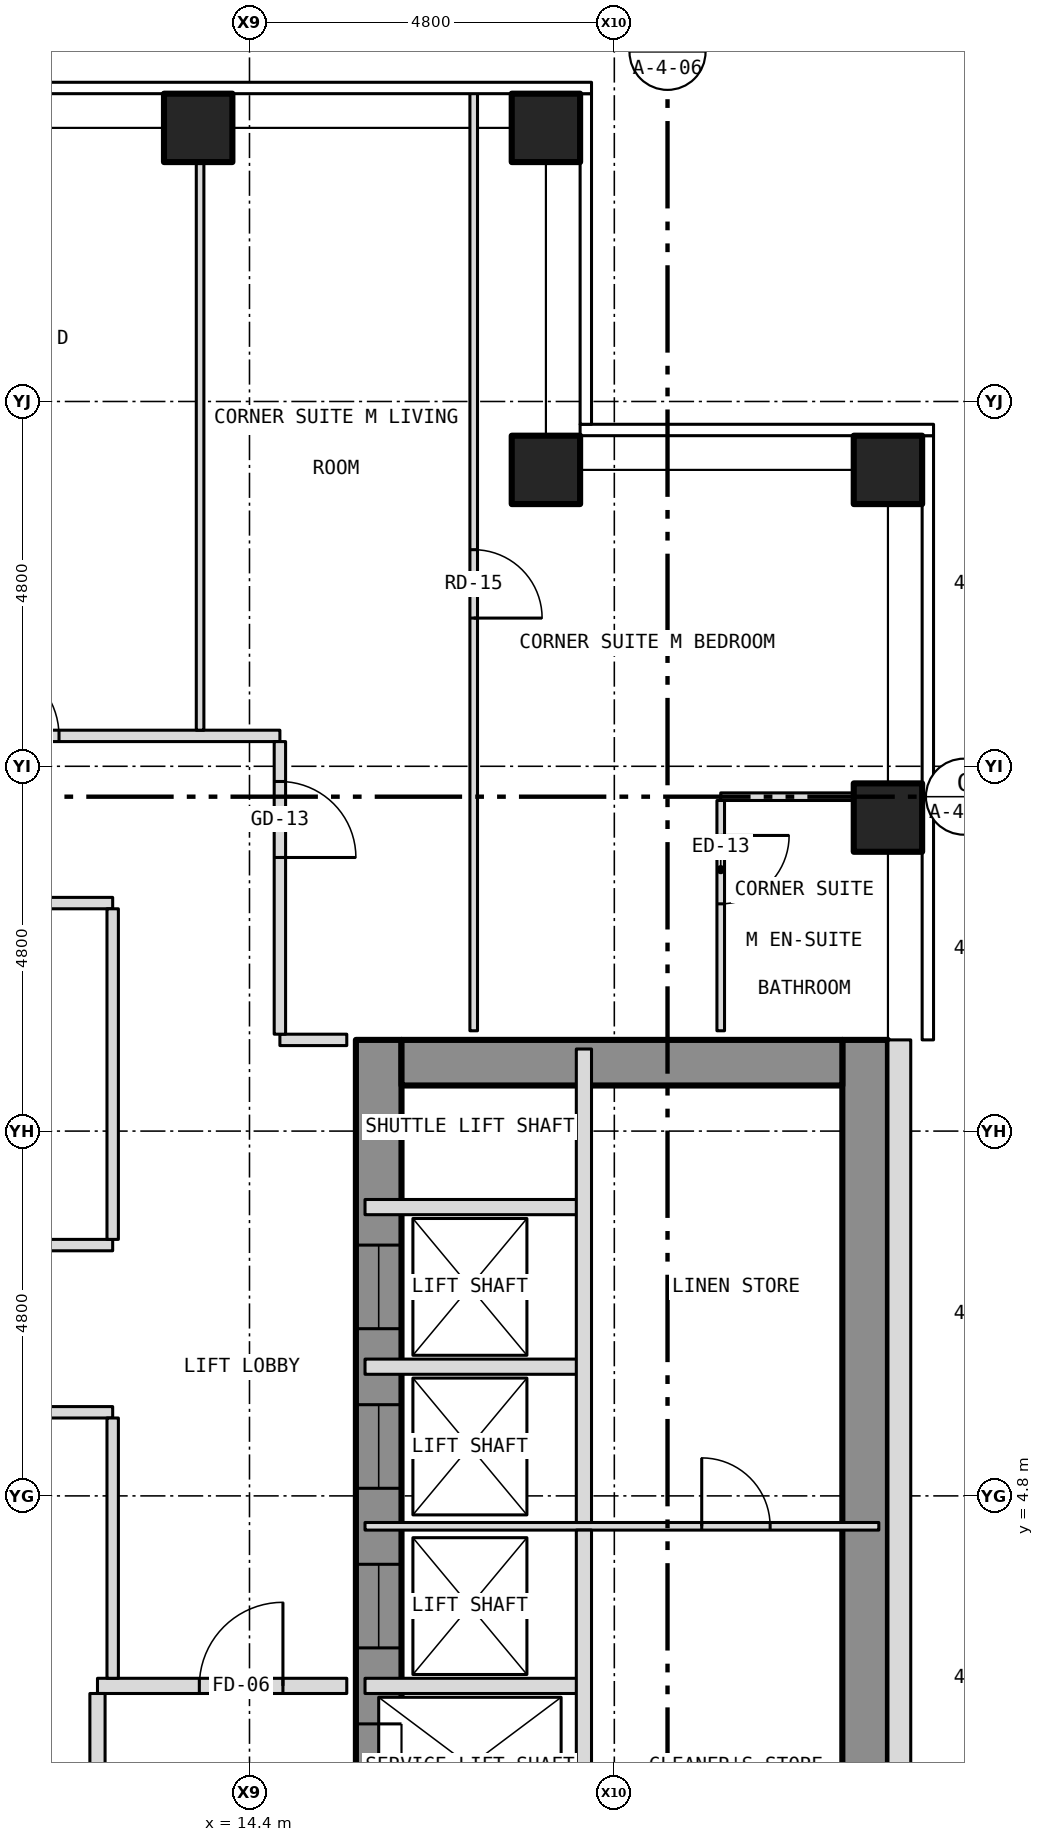
"""IFC4 building model, lengths in metres.
Left out: names, types, materials, properties, quantities, classifications, styles, units other than length and angle.
Written with IfcOpenShell. Run it as: python <this file> out.ifc"""

import sys

from ifc_helpers import new_model, si_unit, direction, frame, frame_2d, origin, origin_2d, place, context, subcontext, project, spatial, rectangle, hollow_rectangle, extrude, element, fill, save


model = new_model("IFC4")
c1 = context("Model", 3, precision=1e-05, world=origin(), true_north=direction((0.0, 1.0)))
c2 = subcontext(c1, "Body", "Model", "MODEL_VIEW")
j1 = project(units=[si_unit("LENGTHUNIT", "METRE"), si_unit("PLANEANGLEUNIT", "RADIAN")], contexts=[c1])
p1 = place(None, origin())
s1 = spatial("IfcSite", under=j1, at=p1, CompositionType="ELEMENT")
p2 = place(p1, origin())
s2 = spatial("IfcBuilding", under=s1, at=p2, CompositionType="ELEMENT")
p3 = place(p2, frame((0.0, 0.0, 92.5)))
s3 = spatial("IfcBuildingStorey", under=s2, at=p3, CompositionType="ELEMENT", Elevation=92.5)
for number, where, z_axis, x_axis in (
    (1, (13.725, 22.8, -0.15), (0.0, 0.0, 1.0), (1.0, 0.0, 0.0)),
    (2, (18.3, 22.8, -0.15), (0.0, 0.0, 1.0), (1.0, 0.0, 0.0)),
    (3, (22.8, 13.725, -0.15), (0.0, 0.0, 1.0), (1.0, 0.0, 0.0)),
    (4, (22.8, 18.3, -0.15), (0.0, 0.0, 1.0), (1.0, 0.0, 0.0)),
    (5, (18.3, 18.3, -0.15), (0.0, 0.0, 1.0), (1.0, 0.0, 0.0)),
):
    element("IfcColumn", number, at=place(p3, frame(where, z_axis=z_axis, x_axis=x_axis)), inside=s3, PredefinedType="COLUMN", context=c2, shape_type="SweptSolid", body=[
        extrude(hollow_rectangle(XDim=0.9, YDim=0.9, WallThickness=0.05, at=origin_2d()), origin(), (0.0, 0.0, 1.0), 3.5),
    ])
p4 = place(p3, frame((16.1, -10.8, 0.0), z_axis=(0.0, 0.0, 1.0), x_axis=(0.0, 1.0, 0.0)))
e6 = element("IfcWall", 6, at=p4, inside=s3, PredefinedType="SHEAR", context=c2, shape_type="SweptSolid", body=[
    extrude(rectangle(XDim=21.6, YDim=0.6, at=frame_2d((10.8, 0.0))), origin(), (0.0, 0.0, 1.0), 3.25),
])
p5 = place(p4, frame((9.4, 0.0, 0.0)))
e7 = element("IfcOpeningElement", 7, at=p5, cuts=e6, PredefinedType="OPENING", context=c2, shape_type="SweptSolid", body=[
    extrude(rectangle(XDim=1.1, YDim=2.1, at=frame_2d((0.55, 1.05))), frame((0.0, 0.312, 0.0), z_axis=(0.0, -1.0, 0.0), x_axis=(1.0, 0.0, 0.0)), (0.0, 0.0, 1.0), 0.624),
])
p6 = place(p4, frame((11.5, 0.0, 0.0)))
e8 = element("IfcOpeningElement", 8, at=p6, cuts=e6, PredefinedType="OPENING", context=c2, shape_type="SweptSolid", body=[
    extrude(rectangle(XDim=1.1, YDim=2.1, at=frame_2d((0.55, 1.05))), frame((0.0, 0.312, 0.0), z_axis=(0.0, -1.0, 0.0), x_axis=(1.0, 0.0, 0.0)), (0.0, 0.0, 1.0), 0.624),
])
p7 = place(p4, frame((13.6, 0.0, 0.0)))
e9 = element("IfcOpeningElement", 9, at=p7, cuts=e6, PredefinedType="OPENING", context=c2, shape_type="SweptSolid", body=[
    extrude(rectangle(XDim=1.1, YDim=2.1, at=frame_2d((0.55, 1.05))), frame((0.0, 0.312, 0.0), z_axis=(0.0, -1.0, 0.0), x_axis=(1.0, 0.0, 0.0)), (0.0, 0.0, 1.0), 0.624),
])
p8 = place(p4, frame((15.7, 0.0, 0.0)))
e10 = element("IfcOpeningElement", 10, at=p8, cuts=e6, PredefinedType="OPENING", context=c2, shape_type="SweptSolid", body=[
    extrude(rectangle(XDim=1.1, YDim=2.1, at=frame_2d((0.55, 1.05))), frame((0.0, 0.312, 0.0), z_axis=(0.0, -1.0, 0.0), x_axis=(1.0, 0.0, 0.0)), (0.0, 0.0, 1.0), 0.624),
])
p9 = place(p4, frame((17.8, 0.0, 0.0)))
e11 = element("IfcOpeningElement", 11, at=p9, cuts=e6, PredefinedType="OPENING", context=c2, shape_type="SweptSolid", body=[
    extrude(rectangle(XDim=1.1, YDim=2.1, at=frame_2d((0.55, 1.05))), frame((0.0, 0.312, 0.0), z_axis=(0.0, -1.0, 0.0), x_axis=(1.0, 0.0, 0.0)), (0.0, 0.0, 1.0), 0.624),
])
p10 = place(p4, frame((5.642, 0.0, 0.0)))
e12 = element("IfcOpeningElement", 12, at=p10, cuts=e6, PredefinedType="OPENING", context=c2, shape_type="SweptSolid", body=[
    extrude(rectangle(XDim=1.1, YDim=2.1, at=frame_2d((0.55, 1.05))), frame((0.0, 0.312, 0.0), z_axis=(0.0, -1.0, 0.0), x_axis=(1.0, 0.0, 0.0)), (0.0, 0.0, 1.0), 0.624),
])
p11 = place(p4, frame((7.5, 0.0, 0.0)))
e13 = element("IfcOpeningElement", 13, at=p11, cuts=e6, PredefinedType="OPENING", context=c2, shape_type="SweptSolid", body=[
    extrude(rectangle(XDim=1.1, YDim=2.1, at=frame_2d((0.55, 1.05))), frame((0.0, 0.312, 0.0), z_axis=(0.0, -1.0, 0.0), x_axis=(1.0, 0.0, 0.0)), (0.0, 0.0, 1.0), 0.624),
])
p12 = place(p3, frame((22.5, -10.8, 0.0), z_axis=(0.0, 0.0, 1.0), x_axis=(0.0, 1.0, 0.0)))
e14 = element("IfcWall", 14, at=p12, inside=s3, PredefinedType="SHEAR", context=c2, shape_type="SweptSolid", body=[
    extrude(rectangle(XDim=21.6, YDim=0.6, at=frame_2d((10.8, 0.0))), origin(), (0.0, 0.0, 1.0), 3.25),
])
p13 = place(p3, frame((16.4, 10.5, 0.0), z_axis=(0.0, 0.0, 1.0), x_axis=(1.0, 0.0, 0.0)))
e15 = element("IfcWall", 15, at=p13, inside=s3, PredefinedType="SHEAR", context=c2, shape_type="SweptSolid", body=[
    extrude(rectangle(XDim=5.8, YDim=0.6, at=frame_2d((2.9, 0.0))), origin(), (0.0, 0.0, 1.0), 3.25),
])
p14 = place(p3, frame((22.95, -10.8, 0.0), z_axis=(0.0, 0.0, 1.0), x_axis=(0.0, 1.0, 0.0)))
e16 = element("IfcWall", 16, at=p14, inside=s3, PredefinedType="SOLIDWALL", context=c2, shape_type="SweptSolid", body=[
    extrude(rectangle(XDim=21.6, YDim=0.3, at=frame_2d((10.8, 0.0))), origin(), (0.0, 0.0, 1.0), 3.5),
])
p15 = place(p14, frame((2.95, 0.0, 1.0)))
e17 = element("IfcOpeningElement", 17, at=p15, cuts=e16, PredefinedType="OPENING", context=c2, shape_type="SweptSolid", body=[
    extrude(rectangle(XDim=0.6, YDim=1.5, at=frame_2d((0.3, 0.75))), frame((0.0, 0.162, 0.0), z_axis=(0.0, -1.0, 0.0), x_axis=(1.0, 0.0, 0.0)), (0.0, 0.0, 1.0), 0.324),
])
p16 = place(p3, frame((12.4, 2.3, 0.0), z_axis=(0.0, 0.0, 1.0), x_axis=(1.0, 0.0, 0.0)))
e18 = element("IfcWall", 18, at=p16, inside=s3, PredefinedType="PARTITIONING", context=c2, shape_type="SweptSolid", body=[
    extrude(rectangle(XDim=3.28, YDim=0.2, at=frame_2d((1.64, 0.0))), origin(), (0.0, 0.0, 1.0), 3.35),
])
p17 = place(p16, frame((1.34, 0.0, 0.0)))
e19 = element("IfcOpeningElement", 19, at=p17, cuts=e18, PredefinedType="OPENING", context=c2, shape_type="SweptSolid", body=[
    extrude(rectangle(XDim=1.1, YDim=2.1, at=frame_2d((0.55, 1.05))), frame((0.0, 0.112, 0.0), z_axis=(0.0, -1.0, 0.0), x_axis=(1.0, 0.0, 0.0)), (0.0, 0.0, 1.0), 0.224),
])
p18 = place(p3, frame((15.92, 2.3, 0.0), z_axis=(0.0, 0.0, 1.0), x_axis=(1.0, 0.0, 0.0)))
e20 = element("IfcWall", 20, at=p18, inside=s3, PredefinedType="PARTITIONING", context=c2, shape_type="SweptSolid", body=[
    extrude(rectangle(XDim=2.88, YDim=0.2, at=frame_2d((1.44, 0.0))), origin(), (0.0, 0.0, 1.0), 3.25),
])
p19 = place(p3, frame((15.92, 4.4, 0.0), z_axis=(0.0, 0.0, 1.0), x_axis=(1.0, 0.0, 0.0)))
e21 = element("IfcWall", 21, at=p19, inside=s3, PredefinedType="PARTITIONING", context=c2, shape_type="SweptSolid", body=[
    extrude(rectangle(XDim=6.76, YDim=0.1, at=frame_2d((3.38, 0.0))), origin(), (0.0, 0.0, 1.0), 3.25),
])
p20 = place(p19, frame((4.43, 0.0, 0.0)))
e22 = element("IfcOpeningElement", 22, at=p20, cuts=e21, PredefinedType="OPENING", context=c2, shape_type="SweptSolid", body=[
    extrude(rectangle(XDim=0.9, YDim=2.1, at=frame_2d((0.45, 1.05))), frame((0.0, 0.062, 0.0), z_axis=(0.0, -1.0, 0.0), x_axis=(1.0, 0.0, 0.0)), (0.0, 0.0, 1.0), 0.124),
])
p21 = place(p3, frame((3.3, 5.9, 0.0), z_axis=(0.0, 0.0, 1.0), x_axis=(1.0, 0.0, 0.0)))
e23 = element("IfcWall", 23, at=p21, inside=s3, PredefinedType="PARTITIONING", context=c2, shape_type="SweptSolid", body=[
    extrude(rectangle(XDim=9.3, YDim=0.15, at=frame_2d((4.65, 0.0))), origin(), (0.0, 0.0, 1.0), 3.35),
])
p22 = place(p21, frame((4.2, 0.0, 0.0)))
e24 = element("IfcOpeningElement", 24, at=p22, cuts=e23, PredefinedType="OPENING", context=c2, shape_type="SweptSolid", body=[
    extrude(rectangle(XDim=0.9, YDim=2.1, at=frame_2d((0.45, 1.05))), frame((0.0, 0.087, 0.0), z_axis=(0.0, -1.0, 0.0), x_axis=(1.0, 0.0, 0.0)), (0.0, 0.0, 1.0), 0.174),
])
p23 = place(p3, frame((15.92, 6.5, 0.0), z_axis=(0.0, 0.0, 1.0), x_axis=(1.0, 0.0, 0.0)))
e25 = element("IfcWall", 25, at=p23, inside=s3, PredefinedType="PARTITIONING", context=c2, shape_type="SweptSolid", body=[
    extrude(rectangle(XDim=2.88, YDim=0.2, at=frame_2d((1.44, 0.0))), origin(), (0.0, 0.0, 1.0), 3.25),
])
p24 = place(p3, frame((3.3, 8.1, 0.0), z_axis=(0.0, 0.0, 1.0), x_axis=(1.0, 0.0, 0.0)))
e26 = element("IfcWall", 26, at=p24, inside=s3, PredefinedType="PARTITIONING", context=c2, shape_type="SweptSolid", body=[
    extrude(rectangle(XDim=9.3, YDim=0.15, at=frame_2d((4.65, 0.0))), origin(), (0.0, 0.0, 1.0), 3.35),
])
p25 = place(p3, frame((15.92, 8.6, 0.0), z_axis=(0.0, 0.0, 1.0), x_axis=(1.0, 0.0, 0.0)))
e27 = element("IfcWall", 27, at=p25, inside=s3, PredefinedType="PARTITIONING", context=c2, shape_type="SweptSolid", body=[
    extrude(rectangle(XDim=2.88, YDim=0.2, at=frame_2d((1.44, 0.0))), origin(), (0.0, 0.0, 1.0), 3.25),
])
p26 = place(p3, frame((14.8, 10.8, 0.0), z_axis=(0.0, 0.0, 1.0), x_axis=(1.0, 0.0, 0.0)))
e28 = element("IfcWall", 28, at=p26, inside=s3, PredefinedType="PARTITIONING", context=c2, shape_type="SweptSolid", body=[
    extrude(rectangle(XDim=0.88, YDim=0.15, at=frame_2d((0.44, 0.0))), origin(), (0.0, 0.0, 1.0), 3.35),
])
p27 = place(p3, frame((3.3, 12.6, 0.0), z_axis=(0.0, 0.0, 1.0), x_axis=(1.0, 0.0, 0.0)))
e29 = element("IfcWall", 29, at=p27, inside=s3, PredefinedType="PARTITIONING", context=c2, shape_type="SweptSolid", body=[
    extrude(rectangle(XDim=9.3, YDim=0.15, at=frame_2d((4.65, 0.0))), origin(), (0.0, 0.0, 1.0), 3.35),
])
p28 = place(p27, frame((1.875, 0.0, 0.0)))
e30 = element("IfcOpeningElement", 30, at=p28, cuts=e29, PredefinedType="OPENING", context=c2, shape_type="SweptSolid", body=[
    extrude(rectangle(XDim=0.9, YDim=2.1, at=frame_2d((0.45, 1.05))), frame((0.0, 0.087, 0.0), z_axis=(0.0, -1.0, 0.0), x_axis=(1.0, 0.0, 0.0)), (0.0, 0.0, 1.0), 0.174),
])
p29 = place(p27, frame((6.525, 0.0, 0.0)))
e31 = element("IfcOpeningElement", 31, at=p29, cuts=e29, PredefinedType="OPENING", context=c2, shape_type="SweptSolid", body=[
    extrude(rectangle(XDim=0.9, YDim=2.1, at=frame_2d((0.45, 1.05))), frame((0.0, 0.087, 0.0), z_axis=(0.0, -1.0, 0.0), x_axis=(1.0, 0.0, 0.0)), (0.0, 0.0, 1.0), 0.174),
])
p30 = place(p3, frame((20.6, 14.0, 0.0), z_axis=(0.0, 0.0, 1.0), x_axis=(1.0, 0.0, 0.0)))
e32 = element("IfcWall", 32, at=p30, inside=s3, PredefinedType="PARTITIONING", context=c2, shape_type="SweptSolid", body=[
    extrude(rectangle(XDim=2.08, YDim=0.1, at=frame_2d((1.04, 0.0))), origin(), (0.0, 0.0, 1.0), 3.35),
])
p31 = place(p3, frame((-14.8, 14.8, 0.0), z_axis=(0.0, 0.0, 1.0), x_axis=(1.0, 0.0, 0.0)))
e33 = element("IfcWall", 33, at=p31, inside=s3, PredefinedType="PARTITIONING", context=c2, shape_type="SweptSolid", body=[
    extrude(rectangle(XDim=29.6, YDim=0.15, at=frame_2d((14.8, 0.0))), origin(), (0.0, 0.0, 1.0), 3.35),
])
p32 = place(p31, frame((5.107, 0.0, 0.0)))
e34 = element("IfcOpeningElement", 34, at=p32, cuts=e33, PredefinedType="OPENING", context=c2, shape_type="SweptSolid", body=[
    extrude(rectangle(XDim=1.0, YDim=2.1, at=frame_2d((0.5, 1.05))), frame((0.0, 0.087, 0.0), z_axis=(0.0, -1.0, 0.0), x_axis=(1.0, 0.0, 0.0)), (0.0, 0.0, 1.0), 0.174),
])
p33 = place(p31, frame((10.826, 0.0, 0.0)))
e35 = element("IfcOpeningElement", 35, at=p33, cuts=e33, PredefinedType="OPENING", context=c2, shape_type="SweptSolid", body=[
    extrude(rectangle(XDim=1.0, YDim=2.1, at=frame_2d((0.5, 1.05))), frame((0.0, 0.087, 0.0), z_axis=(0.0, -1.0, 0.0), x_axis=(1.0, 0.0, 0.0)), (0.0, 0.0, 1.0), 0.174),
])
p34 = place(p31, frame((19.104, 0.0, 0.0)))
e36 = element("IfcOpeningElement", 36, at=p34, cuts=e33, PredefinedType="OPENING", context=c2, shape_type="SweptSolid", body=[
    extrude(rectangle(XDim=1.0, YDim=2.1, at=frame_2d((0.5, 1.05))), frame((0.0, 0.087, 0.0), z_axis=(0.0, -1.0, 0.0), x_axis=(1.0, 0.0, 0.0)), (0.0, 0.0, 1.0), 0.174),
])
p35 = place(p31, frame((25.694, 0.0, 0.0)))
e37 = element("IfcOpeningElement", 37, at=p35, cuts=e33, PredefinedType="OPENING", context=c2, shape_type="SweptSolid", body=[
    extrude(rectangle(XDim=1.0, YDim=2.1, at=frame_2d((0.5, 1.05))), frame((0.0, 0.087, 0.0), z_axis=(0.0, -1.0, 0.0), x_axis=(1.0, 0.0, 0.0)), (0.0, 0.0, 1.0), 0.174),
])
p36 = place(p3, frame((12.4, -1.8, 0.0), z_axis=(0.0, 0.0, 1.0), x_axis=(0.0, 1.0, 0.0)))
e38 = element("IfcWall", 38, at=p36, inside=s3, PredefinedType="PARTITIONING", context=c2, shape_type="SweptSolid", body=[
    extrude(rectangle(XDim=4.0, YDim=0.2, at=frame_2d((2.0, 0.0))), origin(), (0.0, 0.0, 1.0), 3.35),
])
p37 = place(p3, frame((12.6, 2.4, 0.0), z_axis=(0.0, 0.0, 1.0), x_axis=(0.0, 1.0, 0.0)))
e39 = element("IfcWall", 39, at=p37, inside=s3, PredefinedType="PARTITIONING", context=c2, shape_type="SweptSolid", body=[
    extrude(rectangle(XDim=3.425, YDim=0.15, at=frame_2d((1.712, 0.0))), origin(), (0.0, 0.0, 1.0), 3.35),
])
p38 = place(p3, frame((12.6, 8.175, 0.0), z_axis=(0.0, 0.0, 1.0), x_axis=(0.0, 1.0, 0.0)))
e40 = element("IfcWall", 40, at=p38, inside=s3, PredefinedType="PARTITIONING", context=c2, shape_type="SweptSolid", body=[
    extrude(rectangle(XDim=4.35, YDim=0.15, at=frame_2d((2.175, 0.0))), origin(), (0.0, 0.0, 1.0), 3.35),
])
p39 = place(p3, frame((13.75, 14.875, 0.0), z_axis=(0.0, 0.0, 1.0), x_axis=(0.0, 1.0, 0.0)))
e41 = element("IfcWall", 41, at=p39, inside=s3, PredefinedType="PARTITIONING", context=c2, shape_type="SweptSolid", body=[
    extrude(rectangle(XDim=7.805, YDim=0.1, at=frame_2d((3.902, 0.0))), origin(), (0.0, 0.0, 1.0), 3.35),
])
p40 = place(p3, frame((14.8, 10.875, 0.0), z_axis=(0.0, 0.0, 1.0), x_axis=(0.0, 1.0, 0.0)))
e42 = element("IfcWall", 42, at=p40, inside=s3, PredefinedType="PARTITIONING", context=c2, shape_type="SweptSolid", body=[
    extrude(rectangle(XDim=3.85, YDim=0.15, at=frame_2d((1.925, 0.0))), origin(), (0.0, 0.0, 1.0), 3.35),
])
p41 = place(p40, frame((2.325, 0.0, 0.0)))
e43 = element("IfcOpeningElement", 43, at=p41, cuts=e42, PredefinedType="OPENING", context=c2, shape_type="SweptSolid", body=[
    extrude(rectangle(XDim=1.0, YDim=2.1, at=frame_2d((0.5, 1.05))), frame((0.0, 0.087, 0.0), z_axis=(0.0, -1.0, 0.0), x_axis=(1.0, 0.0, 0.0)), (0.0, 0.0, 1.0), 0.174),
])
p42 = place(p3, frame((17.35, 10.92, 0.0), z_axis=(0.0, 0.0, 1.0), x_axis=(0.0, 1.0, 0.0)))
e44 = element("IfcWall", 44, at=p42, inside=s3, PredefinedType="PARTITIONING", context=c2, shape_type="SweptSolid", body=[
    extrude(rectangle(XDim=12.36, YDim=0.1, at=frame_2d((6.18, 0.0))), origin(), (0.0, 0.0, 1.0), 3.35),
])
p43 = place(p42, frame((5.43, 0.0, 0.0)))
e45 = element("IfcOpeningElement", 45, at=p43, cuts=e44, PredefinedType="OPENING", context=c2, shape_type="SweptSolid", body=[
    extrude(rectangle(XDim=0.9, YDim=2.1, at=frame_2d((0.45, 1.05))), frame((0.0, 0.062, 0.0), z_axis=(0.0, -1.0, 0.0), x_axis=(1.0, 0.0, 0.0)), (0.0, 0.0, 1.0), 0.124),
])
p44 = place(p3, frame((18.8, -1.8, 0.0), z_axis=(0.0, 0.0, 1.0), x_axis=(0.0, 1.0, 0.0)))
e46 = element("IfcWall", 46, at=p44, inside=s3, PredefinedType="PARTITIONING", context=c2, shape_type="SweptSolid", body=[
    extrude(rectangle(XDim=6.15, YDim=0.2, at=frame_2d((3.075, 0.0))), origin(), (0.0, 0.0, 1.0), 3.25),
])
p45 = place(p3, frame((18.8, 4.45, 0.0), z_axis=(0.0, 0.0, 1.0), x_axis=(0.0, 1.0, 0.0)))
e47 = element("IfcWall", 47, at=p45, inside=s3, PredefinedType="PARTITIONING", context=c2, shape_type="SweptSolid", body=[
    extrude(rectangle(XDim=6.23, YDim=0.2, at=frame_2d((3.115, 0.0))), origin(), (0.0, 0.0, 1.0), 3.25),
])
p46 = place(p3, frame((20.6, 10.92, 0.0), z_axis=(0.0, 0.0, 1.0), x_axis=(0.0, 1.0, 0.0)))
e48 = element("IfcWall", 48, at=p46, inside=s3, PredefinedType="PARTITIONING", context=c2, shape_type="SweptSolid", body=[
    extrude(rectangle(XDim=3.03, YDim=0.1, at=frame_2d((1.515, 0.0))), origin(), (0.0, 0.0, 1.0), 3.35),
])
p47 = place(p46, frame((1.67, 0.0, 0.0)))
e49 = element("IfcOpeningElement", 49, at=p47, cuts=e48, PredefinedType="OPENING", context=c2, shape_type="SweptSolid", body=[
    extrude(rectangle(XDim=0.9, YDim=2.1, at=frame_2d((0.45, 1.05))), frame((0.0, 0.062, 0.0), z_axis=(0.0, -1.0, 0.0), x_axis=(1.0, 0.0, 0.0)), (0.0, 0.0, 1.0), 0.124),
])
p48 = place(p6, origin())
e50 = element("IfcDoor", 50, at=p48, inside=s3, OperationType="SLIDING_TO_LEFT", PredefinedType="DOOR", context=c2, shape_type="SweptSolid", body=[
    extrude(rectangle(XDim=1.1, YDim=2.1, at=frame_2d((0.55, 1.05))), frame((0.0, 0.025, 0.0), z_axis=(0.0, -1.0, 0.0), x_axis=(1.0, 0.0, 0.0)), (0.0, 0.0, 1.0), 0.05),
])
fill(e8, e50)
p49 = place(p7, origin())
e51 = element("IfcDoor", 51, at=p49, inside=s3, OperationType="SLIDING_TO_LEFT", PredefinedType="DOOR", context=c2, shape_type="SweptSolid", body=[
    extrude(rectangle(XDim=1.1, YDim=2.1, at=frame_2d((0.55, 1.05))), frame((0.0, 0.025, 0.0), z_axis=(0.0, -1.0, 0.0), x_axis=(1.0, 0.0, 0.0)), (0.0, 0.0, 1.0), 0.05),
])
fill(e9, e51)
p50 = place(p8, origin())
e52 = element("IfcDoor", 52, at=p50, inside=s3, OperationType="SLIDING_TO_LEFT", PredefinedType="DOOR", context=c2, shape_type="SweptSolid", body=[
    extrude(rectangle(XDim=1.1, YDim=2.1, at=frame_2d((0.55, 1.05))), frame((0.0, 0.025, 0.0), z_axis=(0.0, -1.0, 0.0), x_axis=(1.0, 0.0, 0.0)), (0.0, 0.0, 1.0), 0.05),
])
fill(e10, e52)
p51 = place(p9, origin())
e53 = element("IfcDoor", 53, at=p51, inside=s3, OperationType="SLIDING_TO_LEFT", PredefinedType="DOOR", context=c2, shape_type="SweptSolid", body=[
    extrude(rectangle(XDim=1.1, YDim=2.1, at=frame_2d((0.55, 1.05))), frame((0.0, 0.025, 0.0), z_axis=(0.0, -1.0, 0.0), x_axis=(1.0, 0.0, 0.0)), (0.0, 0.0, 1.0), 0.05),
])
fill(e11, e53)
p52 = place(p20, origin())
e54 = element("IfcDoor", 54, at=p52, inside=s3, OperationType="SINGLE_SWING_LEFT", PredefinedType="DOOR", context=c2, shape_type="SweptSolid", body=[
    extrude(rectangle(XDim=0.9, YDim=2.1, at=frame_2d((0.45, 1.05))), frame((0.0, 0.025, 0.0), z_axis=(0.0, -1.0, 0.0), x_axis=(1.0, 0.0, 0.0)), (0.0, 0.0, 1.0), 0.05),
])
fill(e22, e54)
p53 = place(p17, origin())
e55 = element("IfcDoor", 55, at=p53, inside=s3, OperationType="SINGLE_SWING_RIGHT", PredefinedType="DOOR", context=c2, shape_type="SweptSolid", body=[
    extrude(rectangle(XDim=1.1, YDim=2.1, at=frame_2d((0.55, 1.05))), frame((0.0, 0.025, 0.0), z_axis=(0.0, -1.0, 0.0), x_axis=(1.0, 0.0, 0.0)), (0.0, 0.0, 1.0), 0.05),
])
fill(e19, e55)
p54 = place(p35, origin())
e56 = element("IfcDoor", 56, at=p54, inside=s3, OperationType="SINGLE_SWING_LEFT", PredefinedType="DOOR", context=c2, shape_type="SweptSolid", body=[
    extrude(rectangle(XDim=1.0, YDim=2.1, at=frame_2d((0.5, 1.05))), frame((0.0, 0.025, 0.0), z_axis=(0.0, -1.0, 0.0), x_axis=(1.0, 0.0, 0.0)), (0.0, 0.0, 1.0), 0.05),
])
fill(e37, e56)
p55 = place(p41, origin())
e57 = element("IfcDoor", 57, at=p55, inside=s3, OperationType="SINGLE_SWING_LEFT", PredefinedType="DOOR", context=c2, shape_type="SweptSolid", body=[
    extrude(rectangle(XDim=1.0, YDim=2.1, at=frame_2d((0.5, 1.05))), frame((0.0, 0.025, 0.0), z_axis=(0.0, -1.0, 0.0), x_axis=(1.0, 0.0, 0.0)), (0.0, 0.0, 1.0), 0.05),
])
fill(e43, e57)
p56 = place(p43, origin())
e58 = element("IfcDoor", 58, at=p56, inside=s3, OperationType="SINGLE_SWING_LEFT", PredefinedType="DOOR", context=c2, shape_type="SweptSolid", body=[
    extrude(rectangle(XDim=0.9, YDim=2.1, at=frame_2d((0.45, 1.05))), frame((0.0, 0.025, 0.0), z_axis=(0.0, -1.0, 0.0), x_axis=(1.0, 0.0, 0.0)), (0.0, 0.0, 1.0), 0.05),
])
fill(e45, e58)
p57 = place(p47, origin())
e59 = element("IfcDoor", 59, at=p57, inside=s3, OperationType="SINGLE_SWING_RIGHT", PredefinedType="DOOR", context=c2, shape_type="SweptSolid", body=[
    extrude(rectangle(XDim=0.9, YDim=2.1, at=frame_2d((0.45, 1.05))), frame((0.0, 0.025, 0.0), z_axis=(0.0, -1.0, 0.0), x_axis=(1.0, 0.0, 0.0)), (0.0, 0.0, 1.0), 0.05),
])
fill(e49, e59)
save(model, sys.argv[1])
